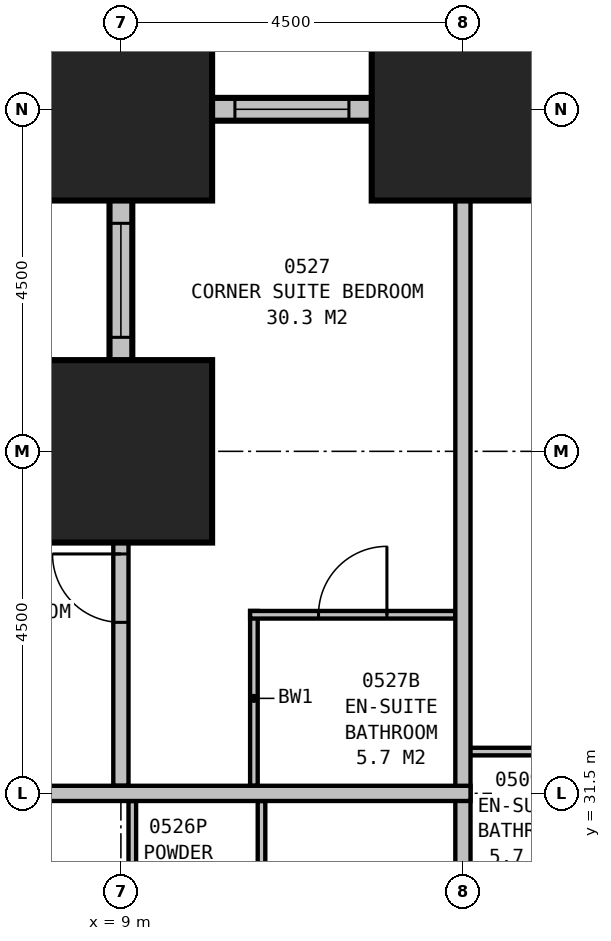
"""IFC4 building model, lengths in metres.
Left out: names, types, materials, properties, quantities, classifications, styles, units other than length and angle.
Written with IfcOpenShell. Run it as: python <this file> out.ifc"""

import sys

from ifc_helpers import new_model, si_unit, direction, frame, frame_2d, origin, origin_2d, place, context, subcontext, project, spatial, rectangle, extrude, element, fill, save


model = new_model("IFC4")
c1 = context("Model", 3, precision=1e-05, world=origin(), true_north=direction((0.0, 1.0)))
c2 = subcontext(c1, "Body", "Model", "MODEL_VIEW")
j1 = project(units=[si_unit("LENGTHUNIT", "METRE"), si_unit("PLANEANGLEUNIT", "RADIAN")], contexts=[c1])
p1 = place(None, origin())
s1 = spatial("IfcSite", under=j1, at=p1, CompositionType="ELEMENT")
p2 = place(p1, origin())
s2 = spatial("IfcBuilding", under=s1, at=p2, CompositionType="ELEMENT")
p3 = place(p2, frame((0.0, 0.0, 29.7)))
s3 = spatial("IfcBuildingStorey", under=s2, at=p3, CompositionType="ELEMENT", Elevation=29.7)
for number, where, z_axis, x_axis in (
    (1, (13.5, 40.5, 0.0), (0.0, 0.0, 1.0), (1.0, 0.0, 0.0)),
    (2, (9.0, 40.5, 0.0), (0.0, 0.0, 1.0), (1.0, 0.0, 0.0)),
    (3, (9.0, 36.0, 0.0), (0.0, 0.0, 1.0), (1.0, 0.0, 0.0)),
):
    element("IfcColumn", number, at=place(p3, frame(where, z_axis=z_axis, x_axis=x_axis)), inside=s3, PredefinedType="COLUMN", context=c2, shape_type="SweptSolid", body=[
        extrude(rectangle(XDim=2.4, YDim=2.4, at=origin_2d()), origin(), (0.0, 0.0, 1.0), 3.5),
    ])
p4 = place(p3, frame((40.65, 40.5, 0.0), z_axis=(0.0, 0.0, 1.0), x_axis=(-1.0, 0.0, 0.0)))
e4 = element("IfcWall", 4, at=p4, inside=s3, PredefinedType="STANDARD", context=c2, shape_type="SweptSolid", body=[
    extrude(rectangle(XDim=31.8, YDim=0.3, at=frame_2d((15.9, 0.0))), origin(), (0.0, 0.0, 1.0), 2.05),
])
p5 = place(p4, frame((1.65, 0.0, 0.5)))
e5 = element("IfcOpeningElement", 5, at=p5, cuts=e4, PredefinedType="OPENING", context=c2, shape_type="SweptSolid", body=[
    extrude(rectangle(XDim=1.5, YDim=1.4, at=frame_2d((0.75, 0.7))), frame((0.0, 0.16, 0.0), z_axis=(0.0, -1.0, 0.0), x_axis=(1.0, 0.0, 0.0)), (0.0, 0.0, 1.0), 0.32),
])
p6 = place(p4, frame((6.15, 0.0, 0.5)))
e6 = element("IfcOpeningElement", 6, at=p6, cuts=e4, PredefinedType="OPENING", context=c2, shape_type="SweptSolid", body=[
    extrude(rectangle(XDim=1.5, YDim=1.4, at=frame_2d((0.75, 0.7))), frame((0.0, 0.16, 0.0), z_axis=(0.0, -1.0, 0.0), x_axis=(1.0, 0.0, 0.0)), (0.0, 0.0, 1.0), 0.32),
])
p7 = place(p4, frame((10.65, 0.0, 0.5)))
e7 = element("IfcOpeningElement", 7, at=p7, cuts=e4, PredefinedType="OPENING", context=c2, shape_type="SweptSolid", body=[
    extrude(rectangle(XDim=1.5, YDim=1.4, at=frame_2d((0.75, 0.7))), frame((0.0, 0.16, 0.0), z_axis=(0.0, -1.0, 0.0), x_axis=(1.0, 0.0, 0.0)), (0.0, 0.0, 1.0), 0.32),
])
p8 = place(p4, frame((15.15, 0.0, 0.5)))
e8 = element("IfcOpeningElement", 8, at=p8, cuts=e4, PredefinedType="OPENING", context=c2, shape_type="SweptSolid", body=[
    extrude(rectangle(XDim=1.5, YDim=1.4, at=frame_2d((0.75, 0.7))), frame((0.0, 0.16, 0.0), z_axis=(0.0, -1.0, 0.0), x_axis=(1.0, 0.0, 0.0)), (0.0, 0.0, 1.0), 0.32),
])
p9 = place(p4, frame((19.65, 0.0, 0.5)))
e9 = element("IfcOpeningElement", 9, at=p9, cuts=e4, PredefinedType="OPENING", context=c2, shape_type="SweptSolid", body=[
    extrude(rectangle(XDim=1.5, YDim=1.4, at=frame_2d((0.75, 0.7))), frame((0.0, 0.16, 0.0), z_axis=(0.0, -1.0, 0.0), x_axis=(1.0, 0.0, 0.0)), (0.0, 0.0, 1.0), 0.32),
])
p10 = place(p4, frame((24.15, 0.0, 0.5)))
e10 = element("IfcOpeningElement", 10, at=p10, cuts=e4, PredefinedType="OPENING", context=c2, shape_type="SweptSolid", body=[
    extrude(rectangle(XDim=1.5, YDim=1.4, at=frame_2d((0.75, 0.7))), frame((0.0, 0.16, 0.0), z_axis=(0.0, -1.0, 0.0), x_axis=(1.0, 0.0, 0.0)), (0.0, 0.0, 1.0), 0.32),
])
p11 = place(p4, frame((28.65, 0.0, 0.5)))
e11 = element("IfcOpeningElement", 11, at=p11, cuts=e4, PredefinedType="OPENING", context=c2, shape_type="SweptSolid", body=[
    extrude(rectangle(XDim=1.5, YDim=1.4, at=frame_2d((0.75, 0.7))), frame((0.0, 0.16, 0.0), z_axis=(0.0, -1.0, 0.0), x_axis=(1.0, 0.0, 0.0)), (0.0, 0.0, 1.0), 0.32),
])
p12 = place(p3, frame((9.0, 40.65, 0.0), z_axis=(0.0, 0.0, 1.0), x_axis=(0.0, -1.0, 0.0)))
e12 = element("IfcWall", 12, at=p12, inside=s3, PredefinedType="STANDARD", context=c2, shape_type="SweptSolid", body=[
    extrude(rectangle(XDim=4.8, YDim=0.3, at=frame_2d((2.4, 0.0))), origin(), (0.0, 0.0, 1.0), 2.05),
])
p13 = place(p12, frame((1.65, 0.0, 0.5)))
e13 = element("IfcOpeningElement", 13, at=p13, cuts=e12, PredefinedType="OPENING", context=c2, shape_type="SweptSolid", body=[
    extrude(rectangle(XDim=1.5, YDim=1.4, at=frame_2d((0.75, 0.7))), frame((0.0, 0.16, 0.0), z_axis=(0.0, -1.0, 0.0), x_axis=(1.0, 0.0, 0.0)), (0.0, 0.0, 1.0), 0.32),
])
p14 = place(p3, frame((9.15, 36.0, 0.0), z_axis=(0.0, 0.0, 1.0), x_axis=(-1.0, 0.0, 0.0)))
e14 = element("IfcWall", 14, at=p14, inside=s3, PredefinedType="STANDARD", context=c2, shape_type="SweptSolid", body=[
    extrude(rectangle(XDim=5.3, YDim=0.3, at=frame_2d((2.65, 0.0))), origin(), (0.0, 0.0, 1.0), 2.05),
])
p15 = place(p14, frame((1.9, 0.0, 0.5)))
e15 = element("IfcOpeningElement", 15, at=p15, cuts=e14, PredefinedType="OPENING", context=c2, shape_type="SweptSolid", body=[
    extrude(rectangle(XDim=1.5, YDim=1.4, at=frame_2d((0.75, 0.7))), frame((0.0, 0.16, 0.0), z_axis=(0.0, -1.0, 0.0), x_axis=(1.0, 0.0, 0.0)), (0.0, 0.0, 1.0), 0.32),
])
p16 = place(p3, frame((13.5, 32.05, 0.0), z_axis=(0.0, 0.0, 1.0), x_axis=(1.0, 0.0, 0.0)))
e16 = element("IfcWall", 16, at=p16, inside=s3, PredefinedType="PLUMBINGWALL", context=c2, shape_type="SweptSolid", body=[
    extrude(rectangle(XDim=2.4, YDim=0.1, at=frame_2d((1.2, 0.0))), origin(), (0.0, 0.0, 1.0), 3.25),
])
p17 = place(p3, frame((13.5, 29.3, 0.0), z_axis=(0.0, 0.0, 1.0), x_axis=(0.0, 1.0, 0.0)))
e17 = element("IfcWall", 17, at=p17, inside=s3, PredefinedType="PARTITIONING", context=c2, shape_type="SweptSolid", body=[
    extrude(rectangle(XDim=11.2, YDim=0.2, at=frame_2d((5.6, 0.0))), origin(), (0.0, 0.0, 1.0), 2.25),
])
p18 = place(p3, frame((13.6, 31.5, 0.0), z_axis=(0.0, 0.0, 1.0), x_axis=(-1.0, 0.0, 0.0)))
e18 = element("IfcWall", 18, at=p18, inside=s3, PredefinedType="PARTITIONING", context=c2, shape_type="SweptSolid", body=[
    extrude(rectangle(XDim=10.099, YDim=0.2, at=frame_2d((5.05, 0.0))), origin(), (0.0, 0.0, 1.0), 3.25),
])
p19 = place(p18, frame((8.749, 0.0, 0.0), z_axis=(0.0, 0.0, 1.0), x_axis=(-1.0, 0.0, 0.0)))
e19 = element("IfcOpeningElement", 19, at=p19, cuts=e18, PredefinedType="OPENING", context=c2, shape_type="SweptSolid", body=[
    extrude(rectangle(XDim=0.9, YDim=2.1, at=frame_2d((0.45, 1.05))), frame((0.0, 0.11, 0.0), z_axis=(0.0, -1.0, 0.0), x_axis=(1.0, 0.0, 0.0)), (0.0, 0.0, 1.0), 0.22),
])
p20 = place(p3, frame((9.15, 31.4, 0.0), z_axis=(0.0, 0.0, 1.0), x_axis=(0.0, -1.0, 0.0)))
e20 = element("IfcWall", 20, at=p20, inside=s3, PredefinedType="PLUMBINGWALL", context=c2, shape_type="SweptSolid", body=[
    extrude(rectangle(XDim=2.0, YDim=0.1, at=frame_2d((1.0, 0.0))), origin(), (0.0, 0.0, 1.0), 2.25),
])
p21 = place(p3, frame((10.85, 31.4, 0.0), z_axis=(0.0, 0.0, 1.0), x_axis=(0.0, -1.0, 0.0)))
e21 = element("IfcWall", 21, at=p21, inside=s3, PredefinedType="PLUMBINGWALL", context=c2, shape_type="SweptSolid", body=[
    extrude(rectangle(XDim=2.0, YDim=0.1, at=frame_2d((1.0, 0.0))), origin(), (0.0, 0.0, 1.0), 3.25),
])
p22 = place(p3, frame((9.0, 31.6, 0.0), z_axis=(0.0, 0.0, 1.0), x_axis=(0.0, 1.0, 0.0)))
e22 = element("IfcWall", 22, at=p22, inside=s3, PredefinedType="PARTITIONING", context=c2, shape_type="SweptSolid", body=[
    extrude(rectangle(XDim=4.4, YDim=0.2, at=frame_2d((2.2, 0.0))), origin(), (0.0, 0.0, 1.0), 2.25),
])
p23 = place(p22, frame((2.15, 0.0, 0.0)))
e23 = element("IfcOpeningElement", 23, at=p23, cuts=e22, PredefinedType="OPENING", context=c2, shape_type="SweptSolid", body=[
    extrude(rectangle(XDim=0.9, YDim=2.1, at=frame_2d((0.45, 1.05))), frame((0.0, 0.11, 0.0), z_axis=(0.0, -1.0, 0.0), x_axis=(1.0, 0.0, 0.0)), (0.0, 0.0, 1.0), 0.22),
])
p24 = place(p3, frame((10.75, 31.6, 0.0), z_axis=(0.0, 0.0, 1.0), x_axis=(0.0, 1.0, 0.0)))
e24 = element("IfcWall", 24, at=p24, inside=s3, PredefinedType="PLUMBINGWALL", context=c2, shape_type="SweptSolid", body=[
    extrude(rectangle(XDim=2.3, YDim=0.1, at=frame_2d((1.15, 0.0))), origin(), (0.0, 0.0, 1.0), 3.25),
])
p25 = place(p3, frame((13.4, 33.85, 0.0), z_axis=(0.0, 0.0, 1.0), x_axis=(-1.0, 0.0, 0.0)))
e25 = element("IfcWall", 25, at=p25, inside=s3, PredefinedType="PLUMBINGWALL", context=c2, shape_type="SweptSolid", body=[
    extrude(rectangle(XDim=2.7, YDim=0.1, at=frame_2d((1.35, 0.0))), origin(), (0.0, 0.0, 1.0), 3.25),
])
p26 = place(p25, frame((1.8, 0.0, 0.0), z_axis=(0.0, 0.0, 1.0), x_axis=(-1.0, 0.0, 0.0)))
e26 = element("IfcOpeningElement", 26, at=p26, cuts=e25, PredefinedType="OPENING", context=c2, shape_type="SweptSolid", body=[
    extrude(rectangle(XDim=0.9, YDim=2.1, at=frame_2d((0.45, 1.05))), frame((0.0, 0.06, 0.0), z_axis=(0.0, -1.0, 0.0), x_axis=(1.0, 0.0, 0.0)), (0.0, 0.0, 1.0), 0.12),
])
p27 = place(p11, origin())
e27 = element("IfcWindow", 27, at=p27, inside=s3, PartitioningType="SINGLE_PANEL", PredefinedType="WINDOW", context=c2, shape_type="SweptSolid", body=[
    extrude(rectangle(XDim=1.5, YDim=1.4, at=frame_2d((0.75, 0.7))), frame((0.0, 0.03, 0.0), z_axis=(0.0, -1.0, 0.0), x_axis=(1.0, 0.0, 0.0)), (0.0, 0.0, 1.0), 0.06),
])
fill(e11, e27)
p28 = place(p13, origin())
e28 = element("IfcWindow", 28, at=p28, inside=s3, PartitioningType="SINGLE_PANEL", PredefinedType="WINDOW", context=c2, shape_type="SweptSolid", body=[
    extrude(rectangle(XDim=1.5, YDim=1.4, at=frame_2d((0.75, 0.7))), frame((0.0, 0.03, 0.0), z_axis=(0.0, -1.0, 0.0), x_axis=(1.0, 0.0, 0.0)), (0.0, 0.0, 1.0), 0.06),
])
fill(e13, e28)
p29 = place(p23, origin())
e29 = element("IfcDoor", 29, at=p29, inside=s3, OperationType="SINGLE_SWING_RIGHT", PredefinedType="DOOR", context=c2, shape_type="SweptSolid", body=[
    extrude(rectangle(XDim=0.9, YDim=2.1, at=frame_2d((0.45, 1.05))), frame((0.0, 0.025, 0.0), z_axis=(0.0, -1.0, 0.0), x_axis=(1.0, 0.0, 0.0)), (0.0, 0.0, 1.0), 0.05),
])
fill(e23, e29)
p30 = place(p26, origin())
e30 = element("IfcDoor", 30, at=p30, inside=s3, OperationType="SINGLE_SWING_RIGHT", PredefinedType="DOOR", context=c2, shape_type="SweptSolid", body=[
    extrude(rectangle(XDim=0.9, YDim=2.1, at=frame_2d((0.45, 1.05))), frame((0.0, 0.025, 0.0), z_axis=(0.0, -1.0, 0.0), x_axis=(1.0, 0.0, 0.0)), (0.0, 0.0, 1.0), 0.05),
])
fill(e26, e30)
save(model, sys.argv[1])
